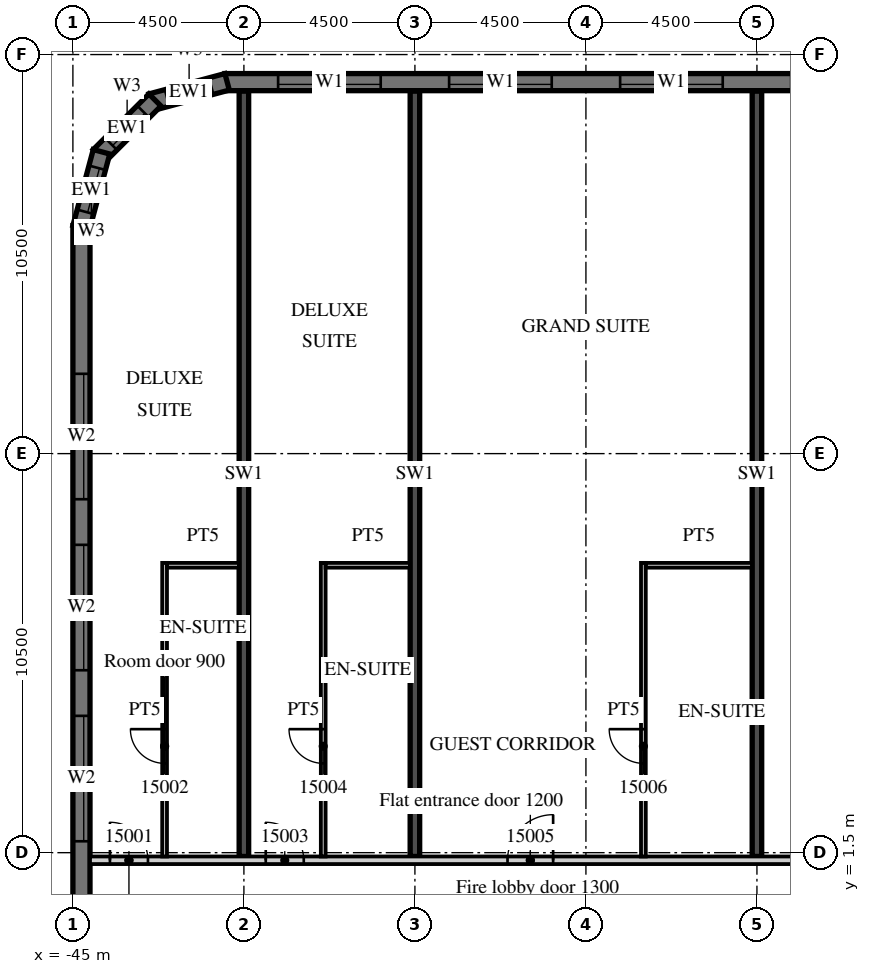
"""IFC4 building model, lengths in metres.
Left out: names, types, materials, properties, quantities, classifications, styles, units other than length and angle.
Written with IfcOpenShell. Run it as: python <this file> out.ifc"""

import sys

from ifc_helpers import new_model, si_unit, direction, frame, frame_2d, origin, place, context, subcontext, project, spatial, polyline, rectangle, outline, extrude, element, fill, save


model = new_model("IFC4")
c1 = context("Model", 3, precision=1e-05, world=origin(), true_north=direction((0.0, 1.0)))
c2 = subcontext(c1, "Body", "Model", "MODEL_VIEW")
j1 = project(units=[si_unit("LENGTHUNIT", "METRE"), si_unit("PLANEANGLEUNIT", "RADIAN")], contexts=[c1])
p1 = place(None, origin())
s1 = spatial("IfcSite", under=j1, at=p1, CompositionType="ELEMENT")
p2 = place(p1, origin())
s2 = spatial("IfcBuilding", under=s1, at=p2, CompositionType="ELEMENT")
p3 = place(p2, frame((0.0, 0.0, 79.8)))
s3 = spatial("IfcBuildingStorey", under=s2, at=p3, CompositionType="ELEMENT", Elevation=79.8)
for number, where, z_axis, x_axis in (
    (1, (-40.5, 1.4, 0.0), (0.0, 0.0, 1.0), (0.0, 1.0, 0.0)),
    (2, (-36.0, 1.4, 0.0), (0.0, 0.0, 1.0), (0.0, 1.0, 0.0)),
    (3, (-27.0, 1.4, 0.0), (0.0, 0.0, 1.0), (0.0, 1.0, 0.0)),
):
    element("IfcWall", number, at=place(p3, frame(where, z_axis=z_axis, x_axis=x_axis)), inside=s3, PredefinedType="SHEAR", context=c2, shape_type="SweptSolid", body=[
        extrude(rectangle(XDim=20.14, YDim=0.25, at=frame_2d((10.07, 0.0))), origin(), (0.0, 0.0, 1.0), 3.3),
    ])
p4 = place(p3, frame((13.5, 21.775, 0.0), z_axis=(0.0, 0.0, 1.0), x_axis=(-1.0, 0.0, 0.0)))
e4 = element("IfcWall", 4, at=p4, inside=s3, PredefinedType="SOLIDWALL", context=c2, shape_type="SweptSolid", body=[
    extrude(rectangle(XDim=54.5, YDim=0.45, at=frame_2d((27.25, 0.0))), origin(), (0.0, 0.0, 1.0), 3.02),
])
p5 = place(p4, frame((0.9, 0.0, 0.45)))
e5 = element("IfcOpeningElement", 5, at=p5, cuts=e4, PredefinedType="OPENING", context=c2, shape_type="SweptSolid", body=[
    extrude(rectangle(XDim=2.7, YDim=2.25, at=frame_2d((1.35, 1.125))), frame((0.0, 0.235, 0.0), z_axis=(0.0, -1.0, 0.0), x_axis=(1.0, 0.0, 0.0)), (0.0, 0.0, 1.0), 0.47),
])
p6 = place(p4, frame((5.4, 0.0, 0.45)))
e6 = element("IfcOpeningElement", 6, at=p6, cuts=e4, PredefinedType="OPENING", context=c2, shape_type="SweptSolid", body=[
    extrude(rectangle(XDim=2.7, YDim=2.25, at=frame_2d((1.35, 1.125))), frame((0.0, 0.235, 0.0), z_axis=(0.0, -1.0, 0.0), x_axis=(1.0, 0.0, 0.0)), (0.0, 0.0, 1.0), 0.47),
])
p7 = place(p4, frame((9.9, 0.0, 0.45)))
e7 = element("IfcOpeningElement", 7, at=p7, cuts=e4, PredefinedType="OPENING", context=c2, shape_type="SweptSolid", body=[
    extrude(rectangle(XDim=2.7, YDim=2.25, at=frame_2d((1.35, 1.125))), frame((0.0, 0.235, 0.0), z_axis=(0.0, -1.0, 0.0), x_axis=(1.0, 0.0, 0.0)), (0.0, 0.0, 1.0), 0.47),
])
p8 = place(p4, frame((14.4, 0.0, 0.45)))
e8 = element("IfcOpeningElement", 8, at=p8, cuts=e4, PredefinedType="OPENING", context=c2, shape_type="SweptSolid", body=[
    extrude(rectangle(XDim=2.7, YDim=2.25, at=frame_2d((1.35, 1.125))), frame((0.0, 0.235, 0.0), z_axis=(0.0, -1.0, 0.0), x_axis=(1.0, 0.0, 0.0)), (0.0, 0.0, 1.0), 0.47),
])
p9 = place(p4, frame((18.9, 0.0, 0.45)))
e9 = element("IfcOpeningElement", 9, at=p9, cuts=e4, PredefinedType="OPENING", context=c2, shape_type="SweptSolid", body=[
    extrude(rectangle(XDim=2.7, YDim=2.25, at=frame_2d((1.35, 1.125))), frame((0.0, 0.235, 0.0), z_axis=(0.0, -1.0, 0.0), x_axis=(1.0, 0.0, 0.0)), (0.0, 0.0, 1.0), 0.47),
])
p10 = place(p4, frame((23.4, 0.0, 0.45)))
e10 = element("IfcOpeningElement", 10, at=p10, cuts=e4, PredefinedType="OPENING", context=c2, shape_type="SweptSolid", body=[
    extrude(rectangle(XDim=2.7, YDim=2.25, at=frame_2d((1.35, 1.125))), frame((0.0, 0.235, 0.0), z_axis=(0.0, -1.0, 0.0), x_axis=(1.0, 0.0, 0.0)), (0.0, 0.0, 1.0), 0.47),
])
p11 = place(p4, frame((27.9, 0.0, 0.45)))
e11 = element("IfcOpeningElement", 11, at=p11, cuts=e4, PredefinedType="OPENING", context=c2, shape_type="SweptSolid", body=[
    extrude(rectangle(XDim=2.7, YDim=2.25, at=frame_2d((1.35, 1.125))), frame((0.0, 0.235, 0.0), z_axis=(0.0, -1.0, 0.0), x_axis=(1.0, 0.0, 0.0)), (0.0, 0.0, 1.0), 0.47),
])
p12 = place(p4, frame((32.4, 0.0, 0.45)))
e12 = element("IfcOpeningElement", 12, at=p12, cuts=e4, PredefinedType="OPENING", context=c2, shape_type="SweptSolid", body=[
    extrude(rectangle(XDim=2.7, YDim=2.25, at=frame_2d((1.35, 1.125))), frame((0.0, 0.235, 0.0), z_axis=(0.0, -1.0, 0.0), x_axis=(1.0, 0.0, 0.0)), (0.0, 0.0, 1.0), 0.47),
])
p13 = place(p4, frame((36.9, 0.0, 0.45)))
e13 = element("IfcOpeningElement", 13, at=p13, cuts=e4, PredefinedType="OPENING", context=c2, shape_type="SweptSolid", body=[
    extrude(rectangle(XDim=2.7, YDim=2.25, at=frame_2d((1.35, 1.125))), frame((0.0, 0.235, 0.0), z_axis=(0.0, -1.0, 0.0), x_axis=(1.0, 0.0, 0.0)), (0.0, 0.0, 1.0), 0.47),
])
p14 = place(p4, frame((41.4, 0.0, 0.45)))
e14 = element("IfcOpeningElement", 14, at=p14, cuts=e4, PredefinedType="OPENING", context=c2, shape_type="SweptSolid", body=[
    extrude(rectangle(XDim=2.7, YDim=2.25, at=frame_2d((1.35, 1.125))), frame((0.0, 0.235, 0.0), z_axis=(0.0, -1.0, 0.0), x_axis=(1.0, 0.0, 0.0)), (0.0, 0.0, 1.0), 0.47),
])
p15 = place(p4, frame((45.9, 0.0, 0.45)))
e15 = element("IfcOpeningElement", 15, at=p15, cuts=e4, PredefinedType="OPENING", context=c2, shape_type="SweptSolid", body=[
    extrude(rectangle(XDim=2.7, YDim=2.25, at=frame_2d((1.35, 1.125))), frame((0.0, 0.235, 0.0), z_axis=(0.0, -1.0, 0.0), x_axis=(1.0, 0.0, 0.0)), (0.0, 0.0, 1.0), 0.47),
])
p16 = place(p4, frame((50.4, 0.0, 0.45)))
e16 = element("IfcOpeningElement", 16, at=p16, cuts=e4, PredefinedType="OPENING", context=c2, shape_type="SweptSolid", body=[
    extrude(rectangle(XDim=2.7, YDim=2.25, at=frame_2d((1.35, 1.125))), frame((0.0, 0.235, 0.0), z_axis=(0.0, -1.0, 0.0), x_axis=(1.0, 0.0, 0.0)), (0.0, 0.0, 1.0), 0.47),
])
p17 = place(p3, frame((-40.942, 21.783, 0.0), z_axis=(0.0, 0.0, 1.0), x_axis=(-0.965926999034, -0.25881466832, 0.0)))
e17 = element("IfcWall", 17, at=p17, inside=s3, PredefinedType="SOLIDWALL", context=c2, shape_type="SweptSolid", body=[
    extrude(outline(polyline([(0.0, -0.225), (2.071, -0.225), (1.95, 0.225), (0.121, 0.225), (0.0, -0.225)])), origin(), (0.0, 0.0, 1.0), 3.02),
])
p18 = place(p17, frame((0.435, 0.0, 0.45)))
e18 = element("IfcOpeningElement", 18, at=p18, cuts=e17, PredefinedType="OPENING", context=c2, shape_type="SweptSolid", body=[
    extrude(rectangle(XDim=1.2, YDim=2.25, at=frame_2d((0.6, 1.125))), frame((0.0, 0.235, 0.0), z_axis=(0.0, -1.0, 0.0), x_axis=(1.0, 0.0, 0.0)), (0.0, 0.0, 1.0), 0.47),
])
p19 = place(p3, frame((-42.841, 21.305, 0.0), z_axis=(0.0, 0.0, 1.0), x_axis=(-0.707106781187, -0.707106781187, 0.0)))
e19 = element("IfcWall", 19, at=p19, inside=s3, PredefinedType="SOLIDWALL", context=c2, shape_type="SweptSolid", body=[
    extrude(outline(polyline([(0.0, -0.225), (2.071, -0.225), (1.95, 0.225), (0.121, 0.225), (0.0, -0.225)])), origin(), (0.0, 0.0, 1.0), 3.02),
])
p20 = place(p19, frame((0.435, 0.0, 0.45)))
e20 = element("IfcOpeningElement", 20, at=p20, cuts=e19, PredefinedType="OPENING", context=c2, shape_type="SweptSolid", body=[
    extrude(rectangle(XDim=1.2, YDim=2.25, at=frame_2d((0.6, 1.125))), frame((0.0, 0.235, 0.0), z_axis=(0.0, -1.0, 0.0), x_axis=(1.0, 0.0, 0.0)), (0.0, 0.0, 1.0), 0.47),
])
p21 = place(p3, frame((-44.247, 19.942, 0.0), z_axis=(0.0, 0.0, 1.0), x_axis=(-0.25881466832, -0.965926999034, 0.0)))
e21 = element("IfcWall", 21, at=p21, inside=s3, PredefinedType="SOLIDWALL", context=c2, shape_type="SweptSolid", body=[
    extrude(outline(polyline([(-0.0, -0.225), (2.07, -0.225), (1.95, 0.225), (0.12, 0.225), (-0.0, -0.225)])), origin(), (0.0, 0.0, 1.0), 3.02),
])
p22 = place(p21, frame((0.435, 0.0, 0.45)))
e22 = element("IfcOpeningElement", 22, at=p22, cuts=e21, PredefinedType="OPENING", context=c2, shape_type="SweptSolid", body=[
    extrude(rectangle(XDim=1.2, YDim=2.25, at=frame_2d((0.6, 1.125))), frame((0.0, 0.235, 0.0), z_axis=(0.0, -1.0, 0.0), x_axis=(1.0, 0.0, 0.0)), (0.0, 0.0, 1.0), 0.47),
])
p23 = place(p3, frame((-44.775, 18.0, 0.0), z_axis=(0.0, 0.0, 1.0), x_axis=(0.0, -1.0, 0.0)))
e23 = element("IfcWall", 23, at=p23, inside=s3, PredefinedType="SOLIDWALL", context=c2, shape_type="SweptSolid", body=[
    extrude(rectangle(XDim=36.0, YDim=0.45, at=frame_2d((18.0, 0.0))), origin(), (0.0, 0.0, 1.0), 3.02),
])
p24 = place(p23, frame((3.9, 0.0, 0.45)))
e24 = element("IfcOpeningElement", 24, at=p24, cuts=e23, PredefinedType="OPENING", context=c2, shape_type="SweptSolid", body=[
    extrude(rectangle(XDim=3.3, YDim=2.25, at=frame_2d((1.65, 1.125))), frame((0.0, 0.235, 0.0), z_axis=(0.0, -1.0, 0.0), x_axis=(1.0, 0.0, 0.0)), (0.0, 0.0, 1.0), 0.47),
])
p25 = place(p23, frame((8.4, 0.0, 0.45)))
e25 = element("IfcOpeningElement", 25, at=p25, cuts=e23, PredefinedType="OPENING", context=c2, shape_type="SweptSolid", body=[
    extrude(rectangle(XDim=3.3, YDim=2.25, at=frame_2d((1.65, 1.125))), frame((0.0, 0.235, 0.0), z_axis=(0.0, -1.0, 0.0), x_axis=(1.0, 0.0, 0.0)), (0.0, 0.0, 1.0), 0.47),
])
p26 = place(p23, frame((12.9, 0.0, 0.45)))
e26 = element("IfcOpeningElement", 26, at=p26, cuts=e23, PredefinedType="OPENING", context=c2, shape_type="SweptSolid", body=[
    extrude(rectangle(XDim=3.3, YDim=2.25, at=frame_2d((1.65, 1.125))), frame((0.0, 0.235, 0.0), z_axis=(0.0, -1.0, 0.0), x_axis=(1.0, 0.0, 0.0)), (0.0, 0.0, 1.0), 0.47),
])
p27 = place(p3, frame((-44.55, 1.3, 0.0), z_axis=(0.0, 0.0, 1.0), x_axis=(1.0, 0.0, 0.0)))
e27 = element("IfcWall", 27, at=p27, inside=s3, PredefinedType="PARTITIONING", context=c2, shape_type="SweptSolid", body=[
    extrude(rectangle(XDim=58.05, YDim=0.2, at=frame_2d((29.025, 0.0))), origin(), (0.0, 0.0, 1.0), 3.02),
])
p28 = place(p27, frame((0.525, 0.0, 0.0)))
e28 = element("IfcOpeningElement", 28, at=p28, cuts=e27, PredefinedType="OPENING", context=c2, shape_type="SweptSolid", body=[
    extrude(rectangle(XDim=1.0, YDim=2.1, at=frame_2d((0.5, 1.05))), frame((0.0, 0.11, 0.0), z_axis=(0.0, -1.0, 0.0), x_axis=(1.0, 0.0, 0.0)), (0.0, 0.0, 1.0), 0.22),
])
p29 = place(p27, frame((4.625, 0.0, 0.0)))
e29 = element("IfcOpeningElement", 29, at=p29, cuts=e27, PredefinedType="OPENING", context=c2, shape_type="SweptSolid", body=[
    extrude(rectangle(XDim=1.0, YDim=2.1, at=frame_2d((0.5, 1.05))), frame((0.0, 0.11, 0.0), z_axis=(0.0, -1.0, 0.0), x_axis=(1.0, 0.0, 0.0)), (0.0, 0.0, 1.0), 0.22),
])
p30 = place(p27, frame((10.987, 0.0, 0.0)))
e30 = element("IfcOpeningElement", 30, at=p30, cuts=e27, PredefinedType="OPENING", context=c2, shape_type="SweptSolid", body=[
    extrude(rectangle(XDim=1.2, YDim=2.1, at=frame_2d((0.6, 1.05))), frame((0.0, 0.11, 0.0), z_axis=(0.0, -1.0, 0.0), x_axis=(1.0, 0.0, 0.0)), (0.0, 0.0, 1.0), 0.22),
])
p31 = place(p27, frame((19.987, 0.0, 0.0)))
e31 = element("IfcOpeningElement", 31, at=p31, cuts=e27, PredefinedType="OPENING", context=c2, shape_type="SweptSolid", body=[
    extrude(rectangle(XDim=1.2, YDim=2.1, at=frame_2d((0.6, 1.05))), frame((0.0, 0.11, 0.0), z_axis=(0.0, -1.0, 0.0), x_axis=(1.0, 0.0, 0.0)), (0.0, 0.0, 1.0), 0.22),
])
p32 = place(p27, frame((28.987, 0.0, 0.0)))
e32 = element("IfcOpeningElement", 32, at=p32, cuts=e27, PredefinedType="OPENING", context=c2, shape_type="SweptSolid", body=[
    extrude(rectangle(XDim=1.2, YDim=2.1, at=frame_2d((0.6, 1.05))), frame((0.0, 0.11, 0.0), z_axis=(0.0, -1.0, 0.0), x_axis=(1.0, 0.0, 0.0)), (0.0, 0.0, 1.0), 0.22),
])
p33 = place(p27, frame((36.125, 0.0, 0.0)))
e33 = element("IfcOpeningElement", 33, at=p33, cuts=e27, PredefinedType="OPENING", context=c2, shape_type="SweptSolid", body=[
    extrude(rectangle(XDim=1.0, YDim=2.1, at=frame_2d((0.5, 1.05))), frame((0.0, 0.11, 0.0), z_axis=(0.0, -1.0, 0.0), x_axis=(1.0, 0.0, 0.0)), (0.0, 0.0, 1.0), 0.22),
])
p34 = place(p27, frame((42.975, 0.0, 0.0)))
e34 = element("IfcOpeningElement", 34, at=p34, cuts=e27, PredefinedType="OPENING", context=c2, shape_type="SweptSolid", body=[
    extrude(rectangle(XDim=1.0, YDim=2.1, at=frame_2d((0.5, 1.05))), frame((0.0, 0.11, 0.0), z_axis=(0.0, -1.0, 0.0), x_axis=(1.0, 0.0, 0.0)), (0.0, 0.0, 1.0), 0.22),
])
p35 = place(p27, frame((46.987, 0.0, 0.0)))
e35 = element("IfcOpeningElement", 35, at=p35, cuts=e27, PredefinedType="OPENING", context=c2, shape_type="SweptSolid", body=[
    extrude(rectangle(XDim=1.2, YDim=2.1, at=frame_2d((0.6, 1.05))), frame((0.0, 0.11, 0.0), z_axis=(0.0, -1.0, 0.0), x_axis=(1.0, 0.0, 0.0)), (0.0, 0.0, 1.0), 0.22),
])
p36 = place(p27, frame((56.475, 0.0, 0.0)))
e36 = element("IfcOpeningElement", 36, at=p36, cuts=e27, PredefinedType="OPENING", context=c2, shape_type="SweptSolid", body=[
    extrude(rectangle(XDim=1.0, YDim=2.1, at=frame_2d((0.5, 1.05))), frame((0.0, 0.11, 0.0), z_axis=(0.0, -1.0, 0.0), x_axis=(1.0, 0.0, 0.0)), (0.0, 0.0, 1.0), 0.22),
])
p37 = place(p3, frame((-42.587, 1.4, 0.0), z_axis=(0.0, 0.0, 1.0), x_axis=(0.0, 1.0, 0.0)))
e37 = element("IfcWall", 37, at=p37, inside=s3, PredefinedType="PARTITIONING", context=c2, shape_type="SweptSolid", body=[
    extrude(rectangle(XDim=7.725, YDim=0.125, at=frame_2d((3.863, 0.0))), origin(), (0.0, 0.0, 1.0), 3.02),
])
p38 = place(p37, frame((2.45, 0.0, 0.0)))
e38 = element("IfcOpeningElement", 38, at=p38, cuts=e37, PredefinedType="OPENING", context=c2, shape_type="SweptSolid", body=[
    extrude(rectangle(XDim=0.9, YDim=2.1, at=frame_2d((0.45, 1.05))), frame((0.0, 0.073, 0.0), z_axis=(0.0, -1.0, 0.0), x_axis=(1.0, 0.0, 0.0)), (0.0, 0.0, 1.0), 0.145),
])
p39 = place(p3, frame((-42.525, 9.062, 0.0), z_axis=(0.0, 0.0, 1.0), x_axis=(1.0, 0.0, 0.0)))
e39 = element("IfcWall", 39, at=p39, inside=s3, PredefinedType="PARTITIONING", context=c2, shape_type="SweptSolid", body=[
    extrude(rectangle(XDim=1.9, YDim=0.125, at=frame_2d((0.95, 0.0))), origin(), (0.0, 0.0, 1.0), 3.02),
])
p40 = place(p3, frame((-38.413, 1.4, 0.0), z_axis=(0.0, 0.0, 1.0), x_axis=(0.0, 1.0, 0.0)))
e40 = element("IfcWall", 40, at=p40, inside=s3, PredefinedType="PARTITIONING", context=c2, shape_type="SweptSolid", body=[
    extrude(rectangle(XDim=7.725, YDim=0.125, at=frame_2d((3.863, 0.0))), origin(), (0.0, 0.0, 1.0), 3.02),
])
p41 = place(p40, frame((2.45, 0.0, 0.0)))
e41 = element("IfcOpeningElement", 41, at=p41, cuts=e40, PredefinedType="OPENING", context=c2, shape_type="SweptSolid", body=[
    extrude(rectangle(XDim=0.9, YDim=2.1, at=frame_2d((0.45, 1.05))), frame((0.0, 0.073, 0.0), z_axis=(0.0, -1.0, 0.0), x_axis=(1.0, 0.0, 0.0)), (0.0, 0.0, 1.0), 0.145),
])
p42 = place(p3, frame((-38.35, 9.062, 0.0), z_axis=(0.0, 0.0, 1.0), x_axis=(1.0, 0.0, 0.0)))
e42 = element("IfcWall", 42, at=p42, inside=s3, PredefinedType="PARTITIONING", context=c2, shape_type="SweptSolid", body=[
    extrude(rectangle(XDim=2.225, YDim=0.125, at=frame_2d((1.113, 0.0))), origin(), (0.0, 0.0, 1.0), 3.02),
])
p43 = place(p3, frame((-29.988, 1.4, 0.0), z_axis=(0.0, 0.0, 1.0), x_axis=(0.0, 1.0, 0.0)))
e43 = element("IfcWall", 43, at=p43, inside=s3, PredefinedType="PARTITIONING", context=c2, shape_type="SweptSolid", body=[
    extrude(rectangle(XDim=7.725, YDim=0.125, at=frame_2d((3.863, 0.0))), origin(), (0.0, 0.0, 1.0), 3.02),
])
p44 = place(p43, frame((2.45, 0.0, 0.0)))
e44 = element("IfcOpeningElement", 44, at=p44, cuts=e43, PredefinedType="OPENING", context=c2, shape_type="SweptSolid", body=[
    extrude(rectangle(XDim=0.9, YDim=2.1, at=frame_2d((0.45, 1.05))), frame((0.0, 0.073, 0.0), z_axis=(0.0, -1.0, 0.0), x_axis=(1.0, 0.0, 0.0)), (0.0, 0.0, 1.0), 0.145),
])
p45 = place(p3, frame((-29.925, 9.062, 0.0), z_axis=(0.0, 0.0, 1.0), x_axis=(1.0, 0.0, 0.0)))
e45 = element("IfcWall", 45, at=p45, inside=s3, PredefinedType="PARTITIONING", context=c2, shape_type="SweptSolid", body=[
    extrude(rectangle(XDim=2.8, YDim=0.125, at=frame_2d((1.4, 0.0))), origin(), (0.0, 0.0, 1.0), 3.02),
])
p46 = place(p14, origin())
e46 = element("IfcWindow", 46, at=p46, inside=s3, PartitioningType="SINGLE_PANEL", PredefinedType="WINDOW", context=c2, shape_type="SweptSolid", body=[
    extrude(rectangle(XDim=2.7, YDim=2.25, at=frame_2d((1.35, 1.125))), frame((0.0, 0.09, 0.0), z_axis=(0.0, -1.0, 0.0), x_axis=(1.0, 0.0, 0.0)), (0.0, 0.0, 1.0), 0.06),
])
fill(e14, e46)
p47 = place(p15, origin())
e47 = element("IfcWindow", 47, at=p47, inside=s3, PartitioningType="SINGLE_PANEL", PredefinedType="WINDOW", context=c2, shape_type="SweptSolid", body=[
    extrude(rectangle(XDim=2.7, YDim=2.25, at=frame_2d((1.35, 1.125))), frame((0.0, 0.09, 0.0), z_axis=(0.0, -1.0, 0.0), x_axis=(1.0, 0.0, 0.0)), (0.0, 0.0, 1.0), 0.06),
])
fill(e15, e47)
p48 = place(p16, origin())
e48 = element("IfcWindow", 48, at=p48, inside=s3, PartitioningType="SINGLE_PANEL", PredefinedType="WINDOW", context=c2, shape_type="SweptSolid", body=[
    extrude(rectangle(XDim=2.7, YDim=2.25, at=frame_2d((1.35, 1.125))), frame((0.0, 0.09, 0.0), z_axis=(0.0, -1.0, 0.0), x_axis=(1.0, 0.0, 0.0)), (0.0, 0.0, 1.0), 0.06),
])
fill(e16, e48)
p49 = place(p18, origin())
e49 = element("IfcWindow", 49, at=p49, inside=s3, PartitioningType="SINGLE_PANEL", PredefinedType="WINDOW", context=c2, shape_type="SweptSolid", body=[
    extrude(rectangle(XDim=1.2, YDim=2.25, at=frame_2d((0.6, 1.125))), frame((0.0, 0.09, 0.0), z_axis=(0.0, -1.0, 0.0), x_axis=(1.0, 0.0, 0.0)), (0.0, 0.0, 1.0), 0.06),
])
fill(e18, e49)
p50 = place(p20, origin())
e50 = element("IfcWindow", 50, at=p50, inside=s3, PartitioningType="SINGLE_PANEL", PredefinedType="WINDOW", context=c2, shape_type="SweptSolid", body=[
    extrude(rectangle(XDim=1.2, YDim=2.25, at=frame_2d((0.6, 1.125))), frame((0.0, 0.09, 0.0), z_axis=(0.0, -1.0, 0.0), x_axis=(1.0, 0.0, 0.0)), (0.0, 0.0, 1.0), 0.06),
])
fill(e20, e50)
p51 = place(p22, origin())
e51 = element("IfcWindow", 51, at=p51, inside=s3, PartitioningType="SINGLE_PANEL", PredefinedType="WINDOW", context=c2, shape_type="SweptSolid", body=[
    extrude(rectangle(XDim=1.2, YDim=2.25, at=frame_2d((0.6, 1.125))), frame((0.0, 0.09, 0.0), z_axis=(0.0, -1.0, 0.0), x_axis=(1.0, 0.0, 0.0)), (0.0, 0.0, 1.0), 0.06),
])
fill(e22, e51)
p52 = place(p24, origin())
e52 = element("IfcWindow", 52, at=p52, inside=s3, PartitioningType="SINGLE_PANEL", PredefinedType="WINDOW", context=c2, shape_type="SweptSolid", body=[
    extrude(rectangle(XDim=3.3, YDim=2.25, at=frame_2d((1.65, 1.125))), frame((0.0, 0.09, 0.0), z_axis=(0.0, -1.0, 0.0), x_axis=(1.0, 0.0, 0.0)), (0.0, 0.0, 1.0), 0.06),
])
fill(e24, e52)
p53 = place(p25, origin())
e53 = element("IfcWindow", 53, at=p53, inside=s3, PartitioningType="SINGLE_PANEL", PredefinedType="WINDOW", context=c2, shape_type="SweptSolid", body=[
    extrude(rectangle(XDim=3.3, YDim=2.25, at=frame_2d((1.65, 1.125))), frame((0.0, 0.09, 0.0), z_axis=(0.0, -1.0, 0.0), x_axis=(1.0, 0.0, 0.0)), (0.0, 0.0, 1.0), 0.06),
])
fill(e25, e53)
p54 = place(p26, origin())
e54 = element("IfcWindow", 54, at=p54, inside=s3, PartitioningType="SINGLE_PANEL", PredefinedType="WINDOW", context=c2, shape_type="SweptSolid", body=[
    extrude(rectangle(XDim=3.3, YDim=2.25, at=frame_2d((1.65, 1.125))), frame((0.0, 0.09, 0.0), z_axis=(0.0, -1.0, 0.0), x_axis=(1.0, 0.0, 0.0)), (0.0, 0.0, 1.0), 0.06),
])
fill(e26, e54)
p55 = place(p28, origin())
e55 = element("IfcDoor", 55, at=p55, inside=s3, OperationType="SINGLE_SWING_LEFT", PredefinedType="DOOR", context=c2, shape_type="SweptSolid", body=[
    extrude(rectangle(XDim=1.0, YDim=2.1, at=frame_2d((0.5, 1.05))), frame((0.0, 0.025, 0.0), z_axis=(0.0, -1.0, 0.0), x_axis=(1.0, 0.0, 0.0)), (0.0, 0.0, 1.0), 0.05),
])
fill(e28, e55)
p56 = place(p38, origin())
e56 = element("IfcDoor", 56, at=p56, inside=s3, OperationType="SINGLE_SWING_RIGHT", PredefinedType="DOOR", context=c2, shape_type="SweptSolid", body=[
    extrude(rectangle(XDim=0.9, YDim=2.1, at=frame_2d((0.45, 1.05))), frame((0.0, 0.025, 0.0), z_axis=(0.0, -1.0, 0.0), x_axis=(1.0, 0.0, 0.0)), (0.0, 0.0, 1.0), 0.05),
])
fill(e38, e56)
p57 = place(p29, origin())
e57 = element("IfcDoor", 57, at=p57, inside=s3, OperationType="SINGLE_SWING_LEFT", PredefinedType="DOOR", context=c2, shape_type="SweptSolid", body=[
    extrude(rectangle(XDim=1.0, YDim=2.1, at=frame_2d((0.5, 1.05))), frame((0.0, 0.025, 0.0), z_axis=(0.0, -1.0, 0.0), x_axis=(1.0, 0.0, 0.0)), (0.0, 0.0, 1.0), 0.05),
])
fill(e29, e57)
p58 = place(p41, origin())
e58 = element("IfcDoor", 58, at=p58, inside=s3, OperationType="SINGLE_SWING_RIGHT", PredefinedType="DOOR", context=c2, shape_type="SweptSolid", body=[
    extrude(rectangle(XDim=0.9, YDim=2.1, at=frame_2d((0.45, 1.05))), frame((0.0, 0.025, 0.0), z_axis=(0.0, -1.0, 0.0), x_axis=(1.0, 0.0, 0.0)), (0.0, 0.0, 1.0), 0.05),
])
fill(e41, e58)
p59 = place(p30, origin())
e59 = element("IfcDoor", 59, at=p59, inside=s3, OperationType="SINGLE_SWING_RIGHT", PredefinedType="DOOR", context=c2, shape_type="SweptSolid", body=[
    extrude(rectangle(XDim=1.2, YDim=2.1, at=frame_2d((0.6, 1.05))), frame((0.0, 0.025, 0.0), z_axis=(0.0, -1.0, 0.0), x_axis=(1.0, 0.0, 0.0)), (0.0, 0.0, 1.0), 0.05),
])
fill(e30, e59)
p60 = place(p44, origin())
e60 = element("IfcDoor", 60, at=p60, inside=s3, OperationType="SINGLE_SWING_RIGHT", PredefinedType="DOOR", context=c2, shape_type="SweptSolid", body=[
    extrude(rectangle(XDim=0.9, YDim=2.1, at=frame_2d((0.45, 1.05))), frame((0.0, 0.025, 0.0), z_axis=(0.0, -1.0, 0.0), x_axis=(1.0, 0.0, 0.0)), (0.0, 0.0, 1.0), 0.05),
])
fill(e44, e60)
save(model, sys.argv[1])
